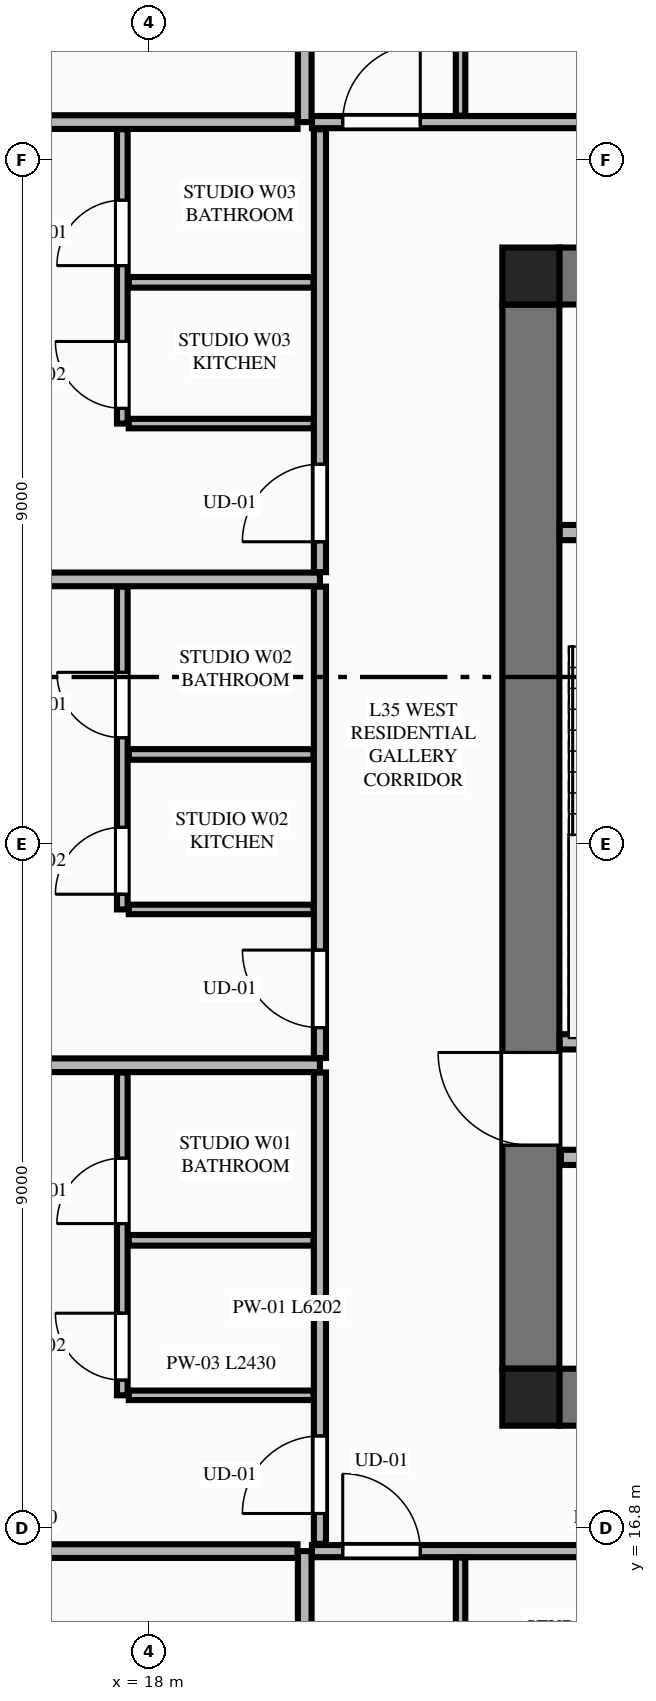
"""IFC4 building model, lengths in metres.
Left out: names, types, materials, properties, quantities, classifications, styles, units other than length and angle.
Written with IfcOpenShell. Run it as: python <this file> out.ifc"""

import sys

from ifc_helpers import new_model, si_unit, direction, frame, frame_2d, origin, origin_2d, place, context, subcontext, project, spatial, rectangle, extrude, element, fill, save


model = new_model("IFC4")
c1 = context("Model", 3, precision=1e-05, world=origin(), true_north=direction((0.0, 1.0)))
c2 = subcontext(c1, "Body", "Model", "MODEL_VIEW")
j1 = project(units=[si_unit("LENGTHUNIT", "METRE"), si_unit("PLANEANGLEUNIT", "RADIAN")], contexts=[c1])
p1 = place(None, origin())
s1 = spatial("IfcSite", under=j1, at=p1, CompositionType="ELEMENT")
p2 = place(p1, origin())
s2 = spatial("IfcBuilding", under=s1, at=p2, CompositionType="ELEMENT")
p3 = place(p2, frame((0.0, 0.0, 133.9)))
s3 = spatial("IfcBuildingStorey", under=s2, at=p3, CompositionType="ELEMENT", Elevation=133.9)
for number, where, z_axis, x_axis in (
    (1, (23.025, 18.525, 0.0), (0.0, 0.0, 1.0), (1.0, 0.0, 0.0)),
    (2, (23.025, 33.275, 0.0), (0.0, 0.0, 1.0), (1.0, 0.0, 0.0)),
):
    element("IfcColumn", number, at=place(p3, frame(where, z_axis=z_axis, x_axis=x_axis)), inside=s3, PredefinedType="COLUMN", context=c2, shape_type="SweptSolid", body=[
        extrude(rectangle(XDim=0.75, YDim=0.75, at=origin_2d()), origin(), (0.0, 0.0, 1.0), 3.55),
    ])
for number, where, z_axis, x_axis in (
    (3, (23.4, 18.525, 0.0), (0.0, 0.0, 1.0), (1.0, 0.0, 0.0)),
    (4, (23.4, 33.275, 0.0), (0.0, 0.0, 1.0), (1.0, 0.0, 0.0)),
):
    element("IfcWall", number, at=place(p3, frame(where, z_axis=z_axis, x_axis=x_axis)), inside=s3, PredefinedType="SHEAR", context=c2, shape_type="SweptSolid", body=[
        extrude(rectangle(XDim=18.0, YDim=0.75, at=frame_2d((9.0, 0.0))), origin(), (0.0, 0.0, 1.0), 3.34),
    ])
p4 = place(p3, frame((23.025, 18.9, 0.0), z_axis=(0.0, 0.0, 1.0), x_axis=(0.0, 1.0, 0.0)))
e5 = element("IfcWall", 5, at=p4, inside=s3, PredefinedType="SHEAR", context=c2, shape_type="SweptSolid", body=[
    extrude(rectangle(XDim=14.0, YDim=0.75, at=frame_2d((7.0, 0.0))), origin(), (0.0, 0.0, 1.0), 3.34),
])
p5 = place(p4, frame((2.94, 0.0, 0.0)))
e6 = element("IfcOpeningElement", 6, at=p5, cuts=e5, PredefinedType="OPENING", context=c2, shape_type="SweptSolid", body=[
    extrude(rectangle(XDim=1.22, YDim=2.25, at=frame_2d((0.61, 1.125))), frame((0.0, 0.385, 0.0), z_axis=(0.0, -1.0, 0.0), x_axis=(1.0, 0.0, 0.0)), (0.0, 0.0, 1.0), 0.77),
])
p6 = place(p3, frame((23.405, 23.2, 0.0), z_axis=(0.0, 0.0, 1.0), x_axis=(1.0, 0.0, 0.0)))
e7 = element("IfcWall", 7, at=p6, inside=s3, PredefinedType="PLUMBINGWALL", context=c2, shape_type="SweptSolid", body=[
    extrude(rectangle(XDim=3.27, YDim=0.2, at=frame_2d((1.635, 0.0))), origin(), (0.0, 0.0, 1.0), 3.34),
])
p7 = place(p3, frame((23.405, 29.9, 0.0), z_axis=(0.0, 0.0, 1.0), x_axis=(1.0, 0.0, 0.0)))
e8 = element("IfcWall", 8, at=p7, inside=s3, PredefinedType="PLUMBINGWALL", context=c2, shape_type="SweptSolid", body=[
    extrude(rectangle(XDim=3.27, YDim=0.2, at=frame_2d((1.635, 0.0))), origin(), (0.0, 0.0, 1.0), 3.34),
])
p8 = place(p7, frame((1.85, 0.0, 0.0)))
e9 = element("IfcOpeningElement", 9, at=p8, cuts=e8, PredefinedType="OPENING", context=c2, shape_type="SweptSolid", body=[
    extrude(rectangle(XDim=0.85, YDim=2.05, at=frame_2d((0.425, 1.025))), frame((0.0, 0.11, 0.0), z_axis=(0.0, -1.0, 0.0), x_axis=(1.0, 0.0, 0.0)), (0.0, 0.0, 1.0), 0.22),
])
p9 = place(p3, frame((23.42, 21.68, 0.0), z_axis=(0.0, 0.0, 1.0), x_axis=(1.0, 0.0, 0.0)))
e10 = element("IfcWall", 10, at=p9, inside=s3, PredefinedType="PLUMBINGWALL", context=c2, shape_type="SweptSolid", body=[
    extrude(rectangle(XDim=17.96, YDim=0.2, at=frame_2d((8.98, 0.0))), origin(), (0.0, 0.0, 1.0), 3.34),
])
p10 = place(p9, frame((11.6, 0.0, 0.0)))
e11 = element("IfcOpeningElement", 11, at=p10, cuts=e10, PredefinedType="OPENING", context=c2, shape_type="SweptSolid", body=[
    extrude(rectangle(XDim=1.1, YDim=2.2, at=frame_2d((0.55, 1.1))), frame((0.0, 0.11, 0.0), z_axis=(0.0, -1.0, 0.0), x_axis=(1.0, 0.0, 0.0)), (0.0, 0.0, 1.0), 0.22),
])
p11 = place(p9, frame((0.41, 0.0, 0.0)))
e12 = element("IfcOpeningElement", 12, at=p11, cuts=e10, PredefinedType="OPENING", context=c2, shape_type="SweptSolid", body=[
    extrude(rectangle(XDim=0.85, YDim=2.05, at=frame_2d((0.425, 1.025))), frame((0.0, 0.11, 0.0), z_axis=(0.0, -1.0, 0.0), x_axis=(1.0, 0.0, 0.0)), (0.0, 0.0, 1.0), 0.22),
])
p12 = place(p9, frame((13.78, 0.0, 0.0)))
e13 = element("IfcOpeningElement", 13, at=p12, cuts=e10, PredefinedType="OPENING", context=c2, shape_type="SweptSolid", body=[
    extrude(rectangle(XDim=0.85, YDim=2.05, at=frame_2d((0.425, 1.025))), frame((0.0, 0.11, 0.0), z_axis=(0.0, -1.0, 0.0), x_axis=(1.0, 0.0, 0.0)), (0.0, 0.0, 1.0), 0.22),
])
p13 = place(p9, frame((16.13, 0.0, 0.0)))
e14 = element("IfcOpeningElement", 14, at=p13, cuts=e10, PredefinedType="OPENING", context=c2, shape_type="SweptSolid", body=[
    extrude(rectangle(XDim=0.85, YDim=2.05, at=frame_2d((0.425, 1.025))), frame((0.0, 0.11, 0.0), z_axis=(0.0, -1.0, 0.0), x_axis=(1.0, 0.0, 0.0)), (0.0, 0.0, 1.0), 0.22),
])
p14 = place(p3, frame((20.05, 4.105, 0.0), z_axis=(0.0, 0.0, 1.0), x_axis=(0.0, 1.0, 0.0)))
e15 = element("IfcWall", 15, at=p14, inside=s3, PredefinedType="PARTITIONING", context=c2, shape_type="SweptSolid", body=[
    extrude(rectangle(XDim=12.395, YDim=0.18, at=frame_2d((6.198, 0.0))), origin(), (0.0, 0.0, 1.0), 3.34),
])
p15 = place(p3, frame((20.145, 16.5, 0.0), z_axis=(0.0, 0.0, 1.0), x_axis=(1.0, 0.0, 0.0)))
e16 = element("IfcWall", 16, at=p15, inside=s3, PredefinedType="PARTITIONING", context=c2, shape_type="SweptSolid", body=[
    extrude(rectangle(XDim=8.328, YDim=0.16, at=frame_2d((4.164, 0.0))), origin(), (0.0, 0.0, 1.0), 3.34),
])
p16 = place(p15, frame((0.405, 0.0, 0.0)))
e17 = element("IfcOpeningElement", 17, at=p16, cuts=e16, PredefinedType="OPENING", context=c2, shape_type="SweptSolid", body=[
    extrude(rectangle(XDim=1.02, YDim=2.25, at=frame_2d((0.51, 1.125))), frame((0.0, 0.09, 0.0), z_axis=(0.0, -1.0, 0.0), x_axis=(1.0, 0.0, 0.0)), (0.0, 0.0, 1.0), 0.18),
])
p17 = place(p3, frame((22.1, 12.887, 0.0), z_axis=(0.0, 0.0, 1.0), x_axis=(0.0, 1.0, 0.0)))
e18 = element("IfcWall", 18, at=p17, inside=s3, PredefinedType="PARTITIONING", context=c2, shape_type="SweptSolid", body=[
    extrude(rectangle(XDim=3.528, YDim=0.125, at=frame_2d((1.764, 0.0))), origin(), (0.0, 0.0, 1.0), 2.722),
])
p18 = place(p3, frame((20.05, 35.3, 0.0), z_axis=(0.0, 0.0, 1.0), x_axis=(0.0, 1.0, 0.0)))
e19 = element("IfcWall", 19, at=p18, inside=s3, PredefinedType="PARTITIONING", context=c2, shape_type="SweptSolid", body=[
    extrude(rectangle(XDim=12.195, YDim=0.18, at=frame_2d((6.098, 0.0))), origin(), (0.0, 0.0, 1.0), 3.34),
])
p19 = place(p3, frame((20.145, 35.3, 0.0), z_axis=(0.0, 0.0, 1.0), x_axis=(1.0, 0.0, 0.0)))
e20 = element("IfcWall", 20, at=p19, inside=s3, PredefinedType="PARTITIONING", context=c2, shape_type="SweptSolid", body=[
    extrude(rectangle(XDim=8.328, YDim=0.16, at=frame_2d((4.164, 0.0))), origin(), (0.0, 0.0, 1.0), 3.34),
])
p20 = place(p19, frame((0.405, 0.0, 0.0)))
e21 = element("IfcOpeningElement", 21, at=p20, cuts=e20, PredefinedType="OPENING", context=c2, shape_type="SweptSolid", body=[
    extrude(rectangle(XDim=1.02, YDim=2.25, at=frame_2d((0.51, 1.125))), frame((0.0, 0.09, 0.0), z_axis=(0.0, -1.0, 0.0), x_axis=(1.0, 0.0, 0.0)), (0.0, 0.0, 1.0), 0.18),
])
p21 = place(p3, frame((22.1, 35.385, 0.0), z_axis=(0.0, 0.0, 1.0), x_axis=(0.0, 1.0, 0.0)))
e22 = element("IfcWall", 22, at=p21, inside=s3, PredefinedType="PARTITIONING", context=c2, shape_type="SweptSolid", body=[
    extrude(rectangle(XDim=6.151, YDim=0.125, at=frame_2d((3.075, 0.0))), origin(), (0.0, 0.0, 1.0), 2.722),
])
p22 = place(p3, frame((12.185, 16.5, 0.0), z_axis=(0.0, 0.0, 1.0), x_axis=(1.0, 0.0, 0.0)))
e23 = element("IfcWall", 23, at=p22, inside=s3, PredefinedType="PARTITIONING", context=c2, shape_type="SweptSolid", body=[
    extrude(rectangle(XDim=7.77, YDim=0.18, at=frame_2d((3.885, 0.0))), origin(), (0.0, 0.0, 1.0), 3.34),
])
p23 = place(p3, frame((12.286, 35.3, 0.0), z_axis=(0.0, 0.0, 1.0), x_axis=(1.0, 0.0, 0.0)))
e24 = element("IfcWall", 24, at=p23, inside=s3, PredefinedType="PARTITIONING", context=c2, shape_type="SweptSolid", body=[
    extrude(rectangle(XDim=7.669, YDim=0.18, at=frame_2d((3.834, 0.0))), origin(), (0.0, 0.0, 1.0), 3.34),
])
p24 = place(p3, frame((20.25, 16.595, 0.0), z_axis=(0.0, 0.0, 1.0), x_axis=(0.0, 1.0, 0.0)))
e25 = element("IfcWall", 25, at=p24, inside=s3, PredefinedType="PARTITIONING", context=c2, shape_type="SweptSolid", body=[
    extrude(rectangle(XDim=6.202, YDim=0.16, at=frame_2d((3.101, 0.0))), origin(), (0.0, 0.0, 1.0), 3.34),
])
p25 = place(p24, frame((0.4, 0.0, 0.0)))
e26 = element("IfcOpeningElement", 26, at=p25, cuts=e25, PredefinedType="OPENING", context=c2, shape_type="SweptSolid", body=[
    extrude(rectangle(XDim=1.02, YDim=2.25, at=frame_2d((0.51, 1.125))), frame((0.0, 0.09, 0.0), z_axis=(0.0, -1.0, 0.0), x_axis=(1.0, 0.0, 0.0)), (0.0, 0.0, 1.0), 0.18),
])
p26 = place(p3, frame((17.735, 18.55, 0.0), z_axis=(0.0, 0.0, 1.0), x_axis=(1.0, 0.0, 0.0)))
e27 = element("IfcWall", 27, at=p26, inside=s3, PredefinedType="PARTITIONING", context=c2, shape_type="SweptSolid", body=[
    extrude(rectangle(XDim=2.43, YDim=0.125, at=frame_2d((1.215, 0.0))), origin(), (0.0, 0.0, 1.0), 2.722),
])
p27 = place(p3, frame((17.65, 18.55, 0.0), z_axis=(0.0, 0.0, 1.0), x_axis=(0.0, 1.0, 0.0)))
e28 = element("IfcWall", 28, at=p27, inside=s3, PredefinedType="PLUMBINGWALL", context=c2, shape_type="SweptSolid", body=[
    extrude(rectangle(XDim=4.247, YDim=0.14, at=frame_2d((2.124, 0.0))), origin(), (0.0, 0.0, 1.0), 3.34),
])
p28 = place(p27, frame((2.259, 0.0, 0.0)))
e29 = element("IfcOpeningElement", 29, at=p28, cuts=e28, PredefinedType="OPENING", context=c2, shape_type="SweptSolid", body=[
    extrude(rectangle(XDim=0.86, YDim=2.1, at=frame_2d((0.43, 1.05))), frame((0.0, 0.08, 0.0), z_axis=(0.0, -1.0, 0.0), x_axis=(1.0, 0.0, 0.0)), (0.0, 0.0, 1.0), 0.16),
])
p29 = place(p27, frame((0.2, 0.0, 0.0)))
e30 = element("IfcOpeningElement", 30, at=p29, cuts=e28, PredefinedType="OPENING", context=c2, shape_type="SweptSolid", body=[
    extrude(rectangle(XDim=0.88, YDim=2.15, at=frame_2d((0.44, 1.075))), frame((0.0, 0.08, 0.0), z_axis=(0.0, -1.0, 0.0), x_axis=(1.0, 0.0, 0.0)), (0.0, 0.0, 1.0), 0.16),
])
p30 = place(p3, frame((17.735, 20.589, 0.0), z_axis=(0.0, 0.0, 1.0), x_axis=(1.0, 0.0, 0.0)))
e31 = element("IfcWall", 31, at=p30, inside=s3, PredefinedType="PLUMBINGWALL", context=c2, shape_type="SweptSolid", body=[
    extrude(rectangle(XDim=2.43, YDim=0.14, at=frame_2d((1.215, 0.0))), origin(), (0.0, 0.0, 1.0), 3.34),
])
p31 = place(p3, frame((8.951, 22.892, 0.0), z_axis=(0.0, 0.0, 1.0), x_axis=(1.0, 0.0, 0.0)))
e32 = element("IfcWall", 32, at=p31, inside=s3, PredefinedType="PARTITIONING", context=c2, shape_type="SweptSolid", body=[
    extrude(rectangle(XDim=11.299, YDim=0.18, at=frame_2d((5.649, 0.0))), origin(), (0.0, 0.0, 1.0), 3.34),
])
p32 = place(p3, frame((20.25, 22.987, 0.0), z_axis=(0.0, 0.0, 1.0), x_axis=(0.0, 1.0, 0.0)))
e33 = element("IfcWall", 33, at=p32, inside=s3, PredefinedType="PARTITIONING", context=c2, shape_type="SweptSolid", body=[
    extrude(rectangle(XDim=6.202, YDim=0.16, at=frame_2d((3.101, 0.0))), origin(), (0.0, 0.0, 1.0), 3.34),
])
p33 = place(p32, frame((0.4, 0.0, 0.0)))
e34 = element("IfcOpeningElement", 34, at=p33, cuts=e33, PredefinedType="OPENING", context=c2, shape_type="SweptSolid", body=[
    extrude(rectangle(XDim=1.02, YDim=2.25, at=frame_2d((0.51, 1.125))), frame((0.0, 0.09, 0.0), z_axis=(0.0, -1.0, 0.0), x_axis=(1.0, 0.0, 0.0)), (0.0, 0.0, 1.0), 0.18),
])
p34 = place(p3, frame((17.735, 24.942, 0.0), z_axis=(0.0, 0.0, 1.0), x_axis=(1.0, 0.0, 0.0)))
e35 = element("IfcWall", 35, at=p34, inside=s3, PredefinedType="PARTITIONING", context=c2, shape_type="SweptSolid", body=[
    extrude(rectangle(XDim=2.43, YDim=0.125, at=frame_2d((1.215, 0.0))), origin(), (0.0, 0.0, 1.0), 3.34),
])
p35 = place(p3, frame((17.65, 24.942, 0.0), z_axis=(0.0, 0.0, 1.0), x_axis=(0.0, 1.0, 0.0)))
e36 = element("IfcWall", 36, at=p35, inside=s3, PredefinedType="PLUMBINGWALL", context=c2, shape_type="SweptSolid", body=[
    extrude(rectangle(XDim=4.247, YDim=0.14, at=frame_2d((2.124, 0.0))), origin(), (0.0, 0.0, 1.0), 3.34),
])
p36 = place(p35, frame((2.259, 0.0, 0.0)))
e37 = element("IfcOpeningElement", 37, at=p36, cuts=e36, PredefinedType="OPENING", context=c2, shape_type="SweptSolid", body=[
    extrude(rectangle(XDim=0.86, YDim=2.1, at=frame_2d((0.43, 1.05))), frame((0.0, 0.08, 0.0), z_axis=(0.0, -1.0, 0.0), x_axis=(1.0, 0.0, 0.0)), (0.0, 0.0, 1.0), 0.16),
])
p37 = place(p35, frame((0.2, 0.0, 0.0)))
e38 = element("IfcOpeningElement", 38, at=p37, cuts=e36, PredefinedType="OPENING", context=c2, shape_type="SweptSolid", body=[
    extrude(rectangle(XDim=0.88, YDim=2.15, at=frame_2d((0.44, 1.075))), frame((0.0, 0.08, 0.0), z_axis=(0.0, -1.0, 0.0), x_axis=(1.0, 0.0, 0.0)), (0.0, 0.0, 1.0), 0.16),
])
p38 = place(p3, frame((17.735, 26.981, 0.0), z_axis=(0.0, 0.0, 1.0), x_axis=(1.0, 0.0, 0.0)))
e39 = element("IfcWall", 39, at=p38, inside=s3, PredefinedType="PLUMBINGWALL", context=c2, shape_type="SweptSolid", body=[
    extrude(rectangle(XDim=2.43, YDim=0.14, at=frame_2d((1.215, 0.0))), origin(), (0.0, 0.0, 1.0), 3.34),
])
p39 = place(p3, frame((9.242, 29.284, 0.0), z_axis=(0.0, 0.0, 1.0), x_axis=(1.0, 0.0, 0.0)))
e40 = element("IfcWall", 40, at=p39, inside=s3, PredefinedType="PARTITIONING", context=c2, shape_type="SweptSolid", body=[
    extrude(rectangle(XDim=11.008, YDim=0.18, at=frame_2d((5.504, 0.0))), origin(), (0.0, 0.0, 1.0), 3.34),
])
p40 = place(p3, frame((20.25, 29.379, 0.0), z_axis=(0.0, 0.0, 1.0), x_axis=(0.0, 1.0, 0.0)))
e41 = element("IfcWall", 41, at=p40, inside=s3, PredefinedType="PARTITIONING", context=c2, shape_type="SweptSolid", body=[
    extrude(rectangle(XDim=5.826, YDim=0.16, at=frame_2d((2.913, 0.0))), origin(), (0.0, 0.0, 1.0), 3.34),
])
p41 = place(p40, frame((0.4, 0.0, 0.0)))
e42 = element("IfcOpeningElement", 42, at=p41, cuts=e41, PredefinedType="OPENING", context=c2, shape_type="SweptSolid", body=[
    extrude(rectangle(XDim=1.02, YDim=2.25, at=frame_2d((0.51, 1.125))), frame((0.0, 0.09, 0.0), z_axis=(0.0, -1.0, 0.0), x_axis=(1.0, 0.0, 0.0)), (0.0, 0.0, 1.0), 0.18),
])
p42 = place(p3, frame((17.735, 31.334, 0.0), z_axis=(0.0, 0.0, 1.0), x_axis=(1.0, 0.0, 0.0)))
e43 = element("IfcWall", 43, at=p42, inside=s3, PredefinedType="PARTITIONING", context=c2, shape_type="SweptSolid", body=[
    extrude(rectangle(XDim=2.43, YDim=0.125, at=frame_2d((1.215, 0.0))), origin(), (0.0, 0.0, 1.0), 3.34),
])
p43 = place(p3, frame((17.65, 31.334, 0.0), z_axis=(0.0, 0.0, 1.0), x_axis=(0.0, 1.0, 0.0)))
e44 = element("IfcWall", 44, at=p43, inside=s3, PredefinedType="PLUMBINGWALL", context=c2, shape_type="SweptSolid", body=[
    extrude(rectangle(XDim=3.871, YDim=0.14, at=frame_2d((1.936, 0.0))), origin(), (0.0, 0.0, 1.0), 3.34),
])
p44 = place(p43, frame((2.078, 0.0, 0.0)))
e45 = element("IfcOpeningElement", 45, at=p44, cuts=e44, PredefinedType="OPENING", context=c2, shape_type="SweptSolid", body=[
    extrude(rectangle(XDim=0.86, YDim=2.1, at=frame_2d((0.43, 1.05))), frame((0.0, 0.08, 0.0), z_axis=(0.0, -1.0, 0.0), x_axis=(1.0, 0.0, 0.0)), (0.0, 0.0, 1.0), 0.16),
])
p45 = place(p43, frame((0.2, 0.0, 0.0)))
e46 = element("IfcOpeningElement", 46, at=p45, cuts=e44, PredefinedType="OPENING", context=c2, shape_type="SweptSolid", body=[
    extrude(rectangle(XDim=0.88, YDim=2.15, at=frame_2d((0.44, 1.075))), frame((0.0, 0.08, 0.0), z_axis=(0.0, -1.0, 0.0), x_axis=(1.0, 0.0, 0.0)), (0.0, 0.0, 1.0), 0.16),
])
p46 = place(p3, frame((17.735, 33.192, 0.0), z_axis=(0.0, 0.0, 1.0), x_axis=(1.0, 0.0, 0.0)))
e47 = element("IfcWall", 47, at=p46, inside=s3, PredefinedType="PLUMBINGWALL", context=c2, shape_type="SweptSolid", body=[
    extrude(rectangle(XDim=2.43, YDim=0.14, at=frame_2d((1.215, 0.0))), origin(), (0.0, 0.0, 1.0), 2.722),
])
p47 = place(p5, origin())
e48 = element("IfcDoor", 48, at=p47, inside=s3, OperationType="SINGLE_SWING_RIGHT", PredefinedType="DOOR", context=c2, shape_type="SweptSolid", body=[
    extrude(rectangle(XDim=1.22, YDim=2.25, at=frame_2d((0.61, 1.125))), frame((0.0, 0.025, 0.0), z_axis=(0.0, -1.0, 0.0), x_axis=(1.0, 0.0, 0.0)), (0.0, 0.0, 1.0), 0.05),
])
fill(e6, e48)
p48 = place(p16, origin())
e49 = element("IfcDoor", 49, at=p48, inside=s3, OperationType="SINGLE_SWING_LEFT", PredefinedType="DOOR", context=c2, shape_type="SweptSolid", body=[
    extrude(rectangle(XDim=1.02, YDim=2.25, at=frame_2d((0.51, 1.125))), frame((0.0, 0.025, 0.0), z_axis=(0.0, -1.0, 0.0), x_axis=(1.0, 0.0, 0.0)), (0.0, 0.0, 1.0), 0.05),
])
fill(e17, e49)
p49 = place(p20, origin())
e50 = element("IfcDoor", 50, at=p49, inside=s3, OperationType="SINGLE_SWING_RIGHT", PredefinedType="DOOR", context=c2, shape_type="SweptSolid", body=[
    extrude(rectangle(XDim=1.02, YDim=2.25, at=frame_2d((0.51, 1.125))), frame((0.0, 0.025, 0.0), z_axis=(0.0, -1.0, 0.0), x_axis=(1.0, 0.0, 0.0)), (0.0, 0.0, 1.0), 0.05),
])
fill(e21, e50)
p50 = place(p28, origin())
e51 = element("IfcDoor", 51, at=p50, inside=s3, OperationType="SINGLE_SWING_LEFT", PredefinedType="DOOR", context=c2, shape_type="SweptSolid", body=[
    extrude(rectangle(XDim=0.86, YDim=2.1, at=frame_2d((0.43, 1.05))), frame((0.0, 0.025, 0.0), z_axis=(0.0, -1.0, 0.0), x_axis=(1.0, 0.0, 0.0)), (0.0, 0.0, 1.0), 0.05),
])
fill(e29, e51)
p51 = place(p25, origin())
e52 = element("IfcDoor", 52, at=p51, inside=s3, OperationType="SINGLE_SWING_LEFT", PredefinedType="DOOR", context=c2, shape_type="SweptSolid", body=[
    extrude(rectangle(XDim=1.02, YDim=2.25, at=frame_2d((0.51, 1.125))), frame((0.0, 0.025, 0.0), z_axis=(0.0, -1.0, 0.0), x_axis=(1.0, 0.0, 0.0)), (0.0, 0.0, 1.0), 0.05),
])
fill(e26, e52)
p52 = place(p29, origin())
e53 = element("IfcDoor", 53, at=p52, inside=s3, OperationType="SINGLE_SWING_RIGHT", PredefinedType="DOOR", context=c2, shape_type="SweptSolid", body=[
    extrude(rectangle(XDim=0.88, YDim=2.15, at=frame_2d((0.44, 1.075))), frame((0.0, 0.025, 0.0), z_axis=(0.0, -1.0, 0.0), x_axis=(1.0, 0.0, 0.0)), (0.0, 0.0, 1.0), 0.05),
])
fill(e30, e53)
p53 = place(p36, origin())
e54 = element("IfcDoor", 54, at=p53, inside=s3, OperationType="SINGLE_SWING_RIGHT", PredefinedType="DOOR", context=c2, shape_type="SweptSolid", body=[
    extrude(rectangle(XDim=0.86, YDim=2.1, at=frame_2d((0.43, 1.05))), frame((0.0, 0.025, 0.0), z_axis=(0.0, -1.0, 0.0), x_axis=(1.0, 0.0, 0.0)), (0.0, 0.0, 1.0), 0.05),
])
fill(e37, e54)
p54 = place(p33, origin())
e55 = element("IfcDoor", 55, at=p54, inside=s3, OperationType="SINGLE_SWING_RIGHT", PredefinedType="DOOR", context=c2, shape_type="SweptSolid", body=[
    extrude(rectangle(XDim=1.02, YDim=2.25, at=frame_2d((0.51, 1.125))), frame((0.0, 0.025, 0.0), z_axis=(0.0, -1.0, 0.0), x_axis=(1.0, 0.0, 0.0)), (0.0, 0.0, 1.0), 0.05),
])
fill(e34, e55)
p55 = place(p37, origin())
e56 = element("IfcDoor", 56, at=p55, inside=s3, OperationType="SINGLE_SWING_LEFT", PredefinedType="DOOR", context=c2, shape_type="SweptSolid", body=[
    extrude(rectangle(XDim=0.88, YDim=2.15, at=frame_2d((0.44, 1.075))), frame((0.0, 0.025, 0.0), z_axis=(0.0, -1.0, 0.0), x_axis=(1.0, 0.0, 0.0)), (0.0, 0.0, 1.0), 0.05),
])
fill(e38, e56)
p56 = place(p44, origin())
e57 = element("IfcDoor", 57, at=p56, inside=s3, OperationType="SINGLE_SWING_LEFT", PredefinedType="DOOR", context=c2, shape_type="SweptSolid", body=[
    extrude(rectangle(XDim=0.86, YDim=2.1, at=frame_2d((0.43, 1.05))), frame((0.0, 0.025, 0.0), z_axis=(0.0, -1.0, 0.0), x_axis=(1.0, 0.0, 0.0)), (0.0, 0.0, 1.0), 0.05),
])
fill(e45, e57)
p57 = place(p41, origin())
e58 = element("IfcDoor", 58, at=p57, inside=s3, OperationType="SINGLE_SWING_LEFT", PredefinedType="DOOR", context=c2, shape_type="SweptSolid", body=[
    extrude(rectangle(XDim=1.02, YDim=2.25, at=frame_2d((0.51, 1.125))), frame((0.0, 0.025, 0.0), z_axis=(0.0, -1.0, 0.0), x_axis=(1.0, 0.0, 0.0)), (0.0, 0.0, 1.0), 0.05),
])
fill(e42, e58)
p58 = place(p45, origin())
e59 = element("IfcDoor", 59, at=p58, inside=s3, OperationType="SINGLE_SWING_RIGHT", PredefinedType="DOOR", context=c2, shape_type="SweptSolid", body=[
    extrude(rectangle(XDim=0.88, YDim=2.15, at=frame_2d((0.44, 1.075))), frame((0.0, 0.025, 0.0), z_axis=(0.0, -1.0, 0.0), x_axis=(1.0, 0.0, 0.0)), (0.0, 0.0, 1.0), 0.05),
])
fill(e46, e59)
save(model, sys.argv[1])
